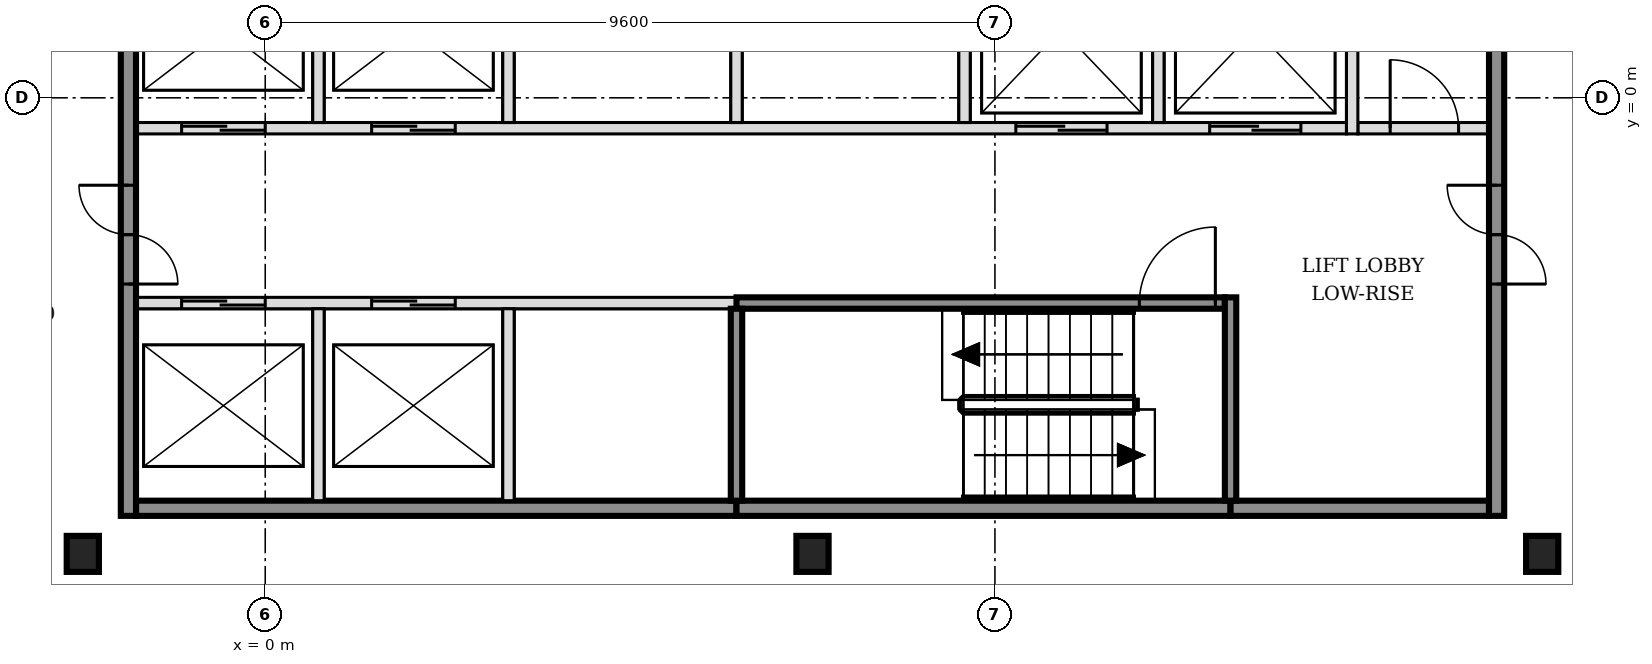
"""IFC4 building model, lengths in metres.
Left out: names, types, materials, properties, quantities, classifications, styles, units other than length and angle.
Written with IfcOpenShell. Run it as: python <this file> out.ifc"""

import sys

from ifc_helpers import new_model, si_unit, direction, frame, frame_2d, origin, origin_2d, place, context, subcontext, project, spatial, rectangle, i_section, extrude, element, fill, save


model = new_model("IFC4")
c1 = context("Model", 3, precision=1e-05, world=origin(), true_north=direction((0.0, 1.0)))
c2 = subcontext(c1, "Body", "Model", "MODEL_VIEW")
j1 = project(units=[si_unit("LENGTHUNIT", "METRE"), si_unit("PLANEANGLEUNIT", "RADIAN")], contexts=[c1])
p1 = place(None, origin())
s1 = spatial("IfcSite", under=j1, at=p1, CompositionType="ELEMENT")
p2 = place(p1, origin())
s2 = spatial("IfcBuilding", under=s1, at=p2, CompositionType="ELEMENT")
p3 = place(p2, frame((0.0, 0.0, 119.4)))
s3 = spatial("IfcBuildingStorey", under=s2, at=p3, CompositionType="ELEMENT", Elevation=119.4)
for number, where, z_axis, x_axis in (
    (1, (-2.4, -6.0, -0.25), (0.0, 0.0, 1.0), (1.0, 0.0, 0.0)),
    (2, (7.2, -6.0, -0.25), (0.0, 0.0, 1.0), (1.0, 0.0, 0.0)),
    (3, (16.8, -6.0, -0.25), (0.0, 0.0, 1.0), (1.0, 0.0, 0.0)),
):
    element("IfcColumn", number, at=place(p3, frame(where, z_axis=z_axis, x_axis=x_axis)), inside=s3, PredefinedType="COLUMN", context=c2, shape_type="SweptSolid", body=[
        extrude(i_section(OverallWidth=0.424, OverallDepth=0.474, WebThickness=0.048, FlangeThickness=0.077, FilletRadius=0.015, at=origin_2d()), origin(), (0.0, 0.0, 1.0), 6.1),
    ])
p4 = place(p3, frame((-1.7, -5.4, 0.0), z_axis=(0.0, 0.0, 1.0), x_axis=(1.0, 0.0, 0.0)))
e4 = element("IfcWall", 4, at=p4, inside=s3, PredefinedType="SOLIDWALL", context=c2, shape_type="SweptSolid", body=[
    extrude(rectangle(XDim=7.9, YDim=0.2, at=frame_2d((3.95, 0.0))), origin(), (0.0, 0.0, 1.0), 5.85),
])
p5 = place(p3, frame((6.2, -5.4, 0.0), z_axis=(0.0, 0.0, 1.0), x_axis=(1.0, 0.0, 0.0)))
e5 = element("IfcWall", 5, at=p5, inside=s3, PredefinedType="SOLIDWALL", context=c2, shape_type="SweptSolid", body=[
    extrude(rectangle(XDim=6.5, YDim=0.2, at=frame_2d((3.25, 0.0))), origin(), (0.0, 0.0, 1.0), 5.85),
])
p6 = place(p3, frame((12.7, -5.4, 0.0), z_axis=(0.0, 0.0, 1.0), x_axis=(1.0, 0.0, 0.0)))
e6 = element("IfcWall", 6, at=p6, inside=s3, PredefinedType="SOLIDWALL", context=c2, shape_type="SweptSolid", body=[
    extrude(rectangle(XDim=3.4, YDim=0.2, at=frame_2d((1.7, 0.0))), origin(), (0.0, 0.0, 1.0), 5.85),
])
p7 = place(p3, frame((-1.7, -2.7, 0.0), z_axis=(0.0, 0.0, 1.0), x_axis=(1.0, 0.0, 0.0)))
e7 = element("IfcWall", 7, at=p7, inside=s3, PredefinedType="SOLIDWALL", context=c2, shape_type="SweptSolid", body=[
    extrude(rectangle(XDim=7.9, YDim=0.15, at=frame_2d((3.95, 0.0))), origin(), (0.0, 0.0, 1.0), 5.85),
])
p8 = place(p7, frame((0.6, 0.0, 0.0)))
e8 = element("IfcOpeningElement", 8, at=p8, cuts=e7, PredefinedType="OPENING", context=c2, shape_type="SweptSolid", body=[
    extrude(rectangle(XDim=1.1, YDim=2.1, at=frame_2d((0.55, 1.05))), frame((0.0, 0.085, 0.0), z_axis=(0.0, -1.0, 0.0), x_axis=(1.0, 0.0, 0.0)), (0.0, 0.0, 1.0), 0.17),
])
p9 = place(p7, frame((3.1, 0.0, 0.0)))
e9 = element("IfcOpeningElement", 9, at=p9, cuts=e7, PredefinedType="OPENING", context=c2, shape_type="SweptSolid", body=[
    extrude(rectangle(XDim=1.1, YDim=2.1, at=frame_2d((0.55, 1.05))), frame((0.0, 0.085, 0.0), z_axis=(0.0, -1.0, 0.0), x_axis=(1.0, 0.0, 0.0)), (0.0, 0.0, 1.0), 0.17),
])
p10 = place(p3, frame((6.2, -2.7, 0.0), z_axis=(0.0, 0.0, 1.0), x_axis=(1.0, 0.0, 0.0)))
e10 = element("IfcWall", 10, at=p10, inside=s3, PredefinedType="SOLIDWALL", context=c2, shape_type="SweptSolid", body=[
    extrude(rectangle(XDim=6.425, YDim=0.15, at=frame_2d((3.212, 0.0))), origin(), (0.0, 0.0, 1.0), 5.85),
])
p11 = place(p10, frame((5.3, 0.0, 0.0)))
e11 = element("IfcOpeningElement", 11, at=p11, cuts=e10, PredefinedType="OPENING", context=c2, shape_type="SweptSolid", body=[
    extrude(rectangle(XDim=1.0, YDim=2.1, at=frame_2d((0.5, 1.05))), frame((0.0, 0.085, 0.0), z_axis=(0.0, -1.0, 0.0), x_axis=(1.0, 0.0, 0.0)), (0.0, 0.0, 1.0), 0.17),
])
p12 = place(p3, frame((-1.7, -0.4, 0.0), z_axis=(0.0, 0.0, 1.0), x_axis=(1.0, 0.0, 0.0)))
e12 = element("IfcWall", 12, at=p12, inside=s3, PredefinedType="SOLIDWALL", context=c2, shape_type="SweptSolid", body=[
    extrude(rectangle(XDim=15.925, YDim=0.15, at=frame_2d((7.962, 0.0))), origin(), (0.0, 0.0, 1.0), 5.85),
])
p13 = place(p12, frame((0.6, 0.0, 0.0)))
e13 = element("IfcOpeningElement", 13, at=p13, cuts=e12, PredefinedType="OPENING", context=c2, shape_type="SweptSolid", body=[
    extrude(rectangle(XDim=1.1, YDim=2.1, at=frame_2d((0.55, 1.05))), frame((0.0, 0.085, 0.0), z_axis=(0.0, -1.0, 0.0), x_axis=(1.0, 0.0, 0.0)), (0.0, 0.0, 1.0), 0.17),
])
p14 = place(p12, frame((3.1, 0.0, 0.0)))
e14 = element("IfcOpeningElement", 14, at=p14, cuts=e12, PredefinedType="OPENING", context=c2, shape_type="SweptSolid", body=[
    extrude(rectangle(XDim=1.1, YDim=2.1, at=frame_2d((0.55, 1.05))), frame((0.0, 0.085, 0.0), z_axis=(0.0, -1.0, 0.0), x_axis=(1.0, 0.0, 0.0)), (0.0, 0.0, 1.0), 0.17),
])
p15 = place(p12, frame((11.575, 0.0, 0.0)))
e15 = element("IfcOpeningElement", 15, at=p15, cuts=e12, PredefinedType="OPENING", context=c2, shape_type="SweptSolid", body=[
    extrude(rectangle(XDim=1.2, YDim=2.1, at=frame_2d((0.6, 1.05))), frame((0.0, 0.085, 0.0), z_axis=(0.0, -1.0, 0.0), x_axis=(1.0, 0.0, 0.0)), (0.0, 0.0, 1.0), 0.17),
])
p16 = place(p12, frame((14.125, 0.0, 0.0)))
e16 = element("IfcOpeningElement", 16, at=p16, cuts=e12, PredefinedType="OPENING", context=c2, shape_type="SweptSolid", body=[
    extrude(rectangle(XDim=1.2, YDim=2.1, at=frame_2d((0.6, 1.05))), frame((0.0, 0.085, 0.0), z_axis=(0.0, -1.0, 0.0), x_axis=(1.0, 0.0, 0.0)), (0.0, 0.0, 1.0), 0.17),
])
p17 = place(p3, frame((14.375, -0.4, 0.0), z_axis=(0.0, 0.0, 1.0), x_axis=(1.0, 0.0, 0.0)))
e17 = element("IfcWall", 17, at=p17, inside=s3, PredefinedType="PARTITIONING", context=c2, shape_type="SweptSolid", body=[
    extrude(rectangle(XDim=1.725, YDim=0.15, at=frame_2d((0.863, 0.0))), origin(), (0.0, 0.0, 1.0), 5.85),
])
p18 = place(p17, frame((0.425, 0.0, 0.0)))
e18 = element("IfcOpeningElement", 18, at=p18, cuts=e17, PredefinedType="OPENING", context=c2, shape_type="SweptSolid", body=[
    extrude(rectangle(XDim=0.9, YDim=2.1, at=frame_2d((0.45, 1.05))), frame((0.0, 0.085, 0.0), z_axis=(0.0, -1.0, 0.0), x_axis=(1.0, 0.0, 0.0)), (0.0, 0.0, 1.0), 0.17),
])
p19 = place(p3, frame((-1.8, -5.5, 0.0), z_axis=(0.0, 0.0, 1.0), x_axis=(0.0, 1.0, 0.0)))
e19 = element("IfcWall", 19, at=p19, inside=s3, PredefinedType="SOLIDWALL", context=c2, shape_type="SweptSolid", body=[
    extrude(rectangle(XDim=15.8, YDim=0.2, at=frame_2d((7.9, 0.0))), origin(), (0.0, 0.0, 1.0), 5.85),
])
p20 = place(p19, frame((3.05, 0.0, 0.0)))
e20 = element("IfcOpeningElement", 20, at=p20, cuts=e19, PredefinedType="OPENING", context=c2, shape_type="SweptSolid", body=[
    extrude(rectangle(XDim=1.3, YDim=2.1, at=frame_2d((0.65, 1.05))), frame((0.0, 0.11, 0.0), z_axis=(0.0, -1.0, 0.0), x_axis=(1.0, 0.0, 0.0)), (0.0, 0.0, 1.0), 0.22),
])
p21 = place(p19, frame((11.45, 0.0, 0.0)))
e21 = element("IfcOpeningElement", 21, at=p21, cuts=e19, PredefinedType="OPENING", context=c2, shape_type="SweptSolid", body=[
    extrude(rectangle(XDim=1.3, YDim=2.1, at=frame_2d((0.65, 1.05))), frame((0.0, 0.11, 0.0), z_axis=(0.0, -1.0, 0.0), x_axis=(1.0, 0.0, 0.0)), (0.0, 0.0, 1.0), 0.22),
])
p22 = place(p3, frame((0.7, -5.3, 0.0), z_axis=(0.0, 0.0, 1.0), x_axis=(0.0, 1.0, 0.0)))
e22 = element("IfcWall", 22, at=p22, inside=s3, PredefinedType="SOLIDWALL", context=c2, shape_type="SweptSolid", body=[
    extrude(rectangle(XDim=2.525, YDim=0.15, at=frame_2d((1.263, 0.0))), origin(), (0.0, 0.0, 1.0), 5.85),
])
p23 = place(p3, frame((0.7, -0.325, 0.0), z_axis=(0.0, 0.0, 1.0), x_axis=(0.0, 1.0, 0.0)))
e23 = element("IfcWall", 23, at=p23, inside=s3, PredefinedType="SOLIDWALL", context=c2, shape_type="SweptSolid", body=[
    extrude(rectangle(XDim=2.45, YDim=0.15, at=frame_2d((1.225, 0.0))), origin(), (0.0, 0.0, 1.0), 5.85),
])
p24 = place(p3, frame((3.2, -5.3, 0.0), z_axis=(0.0, 0.0, 1.0), x_axis=(0.0, 1.0, 0.0)))
e24 = element("IfcWall", 24, at=p24, inside=s3, PredefinedType="SOLIDWALL", context=c2, shape_type="SweptSolid", body=[
    extrude(rectangle(XDim=2.525, YDim=0.15, at=frame_2d((1.263, 0.0))), origin(), (0.0, 0.0, 1.0), 5.85),
])
p25 = place(p3, frame((3.2, -0.325, 0.0), z_axis=(0.0, 0.0, 1.0), x_axis=(0.0, 1.0, 0.0)))
e25 = element("IfcWall", 25, at=p25, inside=s3, PredefinedType="SOLIDWALL", context=c2, shape_type="SweptSolid", body=[
    extrude(rectangle(XDim=2.45, YDim=0.15, at=frame_2d((1.225, 0.0))), origin(), (0.0, 0.0, 1.0), 5.85),
])
p26 = place(p3, frame((6.2, -5.3, 0.0), z_axis=(0.0, 0.0, 1.0), x_axis=(0.0, 1.0, 0.0)))
e26 = element("IfcWall", 26, at=p26, inside=s3, PredefinedType="SOLIDWALL", context=c2, shape_type="SweptSolid", body=[
    extrude(rectangle(XDim=2.525, YDim=0.15, at=frame_2d((1.263, 0.0))), origin(), (0.0, 0.0, 1.0), 5.85),
])
for number, where, z_axis, x_axis in (
    (27, (6.2, -0.325, 0.0), (0.0, 0.0, 1.0), (0.0, 1.0, 0.0)),
    (28, (9.2, -0.325, 0.0), (0.0, 0.0, 1.0), (0.0, 1.0, 0.0)),
    (29, (11.75, -0.325, 0.0), (0.0, 0.0, 1.0), (0.0, 1.0, 0.0)),
):
    element("IfcWall", number, at=place(p3, frame(where, z_axis=z_axis, x_axis=x_axis)), inside=s3, PredefinedType="SOLIDWALL", context=c2, shape_type="SweptSolid", body=[
        extrude(rectangle(XDim=2.45, YDim=0.15, at=frame_2d((1.225, 0.0))), origin(), (0.0, 0.0, 1.0), 5.85),
    ])
p27 = place(p3, frame((12.7, -5.3, 0.0), z_axis=(0.0, 0.0, 1.0), x_axis=(0.0, 1.0, 0.0)))
e30 = element("IfcWall", 30, at=p27, inside=s3, PredefinedType="SOLIDWALL", context=c2, shape_type="SweptSolid", body=[
    extrude(rectangle(XDim=2.675, YDim=0.15, at=frame_2d((1.337, 0.0))), origin(), (0.0, 0.0, 1.0), 5.85),
])
p28 = place(p3, frame((14.3, -0.475, 0.0), z_axis=(0.0, 0.0, 1.0), x_axis=(0.0, 1.0, 0.0)))
e31 = element("IfcWall", 31, at=p28, inside=s3, PredefinedType="SOLIDWALL", context=c2, shape_type="SweptSolid", body=[
    extrude(rectangle(XDim=2.75, YDim=0.15, at=frame_2d((1.375, 0.0))), origin(), (0.0, 0.0, 1.0), 5.85),
])
p29 = place(p3, frame((16.2, -5.5, 0.0), z_axis=(0.0, 0.0, 1.0), x_axis=(0.0, 1.0, 0.0)))
e32 = element("IfcWall", 32, at=p29, inside=s3, PredefinedType="SOLIDWALL", context=c2, shape_type="SweptSolid", body=[
    extrude(rectangle(XDim=15.8, YDim=0.2, at=frame_2d((7.9, 0.0))), origin(), (0.0, 0.0, 1.0), 5.85),
])
p30 = place(p29, frame((3.05, 0.0, 0.0)))
e33 = element("IfcOpeningElement", 33, at=p30, cuts=e32, PredefinedType="OPENING", context=c2, shape_type="SweptSolid", body=[
    extrude(rectangle(XDim=1.3, YDim=2.1, at=frame_2d((0.65, 1.05))), frame((0.0, 0.11, 0.0), z_axis=(0.0, -1.0, 0.0), x_axis=(1.0, 0.0, 0.0)), (0.0, 0.0, 1.0), 0.22),
])
p31 = place(p29, frame((11.45, 0.0, 0.0)))
e34 = element("IfcOpeningElement", 34, at=p31, cuts=e32, PredefinedType="OPENING", context=c2, shape_type="SweptSolid", body=[
    extrude(rectangle(XDim=1.3, YDim=2.1, at=frame_2d((0.65, 1.05))), frame((0.0, 0.11, 0.0), z_axis=(0.0, -1.0, 0.0), x_axis=(1.0, 0.0, 0.0)), (0.0, 0.0, 1.0), 0.22),
])
p32 = place(p8, origin())
e35 = element("IfcDoor", 35, at=p32, inside=s3, OperationType="DOUBLE_DOOR_SLIDING", PredefinedType="DOOR", context=c2, shape_type="SweptSolid", body=[
    extrude(rectangle(XDim=1.1, YDim=2.1, at=frame_2d((0.55, 1.05))), frame((0.0, 0.025, 0.0), z_axis=(0.0, -1.0, 0.0), x_axis=(1.0, 0.0, 0.0)), (0.0, 0.0, 1.0), 0.05),
])
fill(e8, e35)
p33 = place(p9, origin())
e36 = element("IfcDoor", 36, at=p33, inside=s3, OperationType="DOUBLE_DOOR_SLIDING", PredefinedType="DOOR", context=c2, shape_type="SweptSolid", body=[
    extrude(rectangle(XDim=1.1, YDim=2.1, at=frame_2d((0.55, 1.05))), frame((0.0, 0.025, 0.0), z_axis=(0.0, -1.0, 0.0), x_axis=(1.0, 0.0, 0.0)), (0.0, 0.0, 1.0), 0.05),
])
fill(e9, e36)
p34 = place(p13, origin())
e37 = element("IfcDoor", 37, at=p34, inside=s3, OperationType="DOUBLE_DOOR_SLIDING", PredefinedType="DOOR", context=c2, shape_type="SweptSolid", body=[
    extrude(rectangle(XDim=1.1, YDim=2.1, at=frame_2d((0.55, 1.05))), frame((0.0, 0.025, 0.0), z_axis=(0.0, -1.0, 0.0), x_axis=(1.0, 0.0, 0.0)), (0.0, 0.0, 1.0), 0.05),
])
fill(e13, e37)
p35 = place(p14, origin())
e38 = element("IfcDoor", 38, at=p35, inside=s3, OperationType="DOUBLE_DOOR_SLIDING", PredefinedType="DOOR", context=c2, shape_type="SweptSolid", body=[
    extrude(rectangle(XDim=1.1, YDim=2.1, at=frame_2d((0.55, 1.05))), frame((0.0, 0.025, 0.0), z_axis=(0.0, -1.0, 0.0), x_axis=(1.0, 0.0, 0.0)), (0.0, 0.0, 1.0), 0.05),
])
fill(e14, e38)
p36 = place(p15, origin())
e39 = element("IfcDoor", 39, at=p36, inside=s3, OperationType="DOUBLE_DOOR_SLIDING", PredefinedType="DOOR", context=c2, shape_type="SweptSolid", body=[
    extrude(rectangle(XDim=1.2, YDim=2.1, at=frame_2d((0.6, 1.05))), frame((0.0, 0.025, 0.0), z_axis=(0.0, -1.0, 0.0), x_axis=(1.0, 0.0, 0.0)), (0.0, 0.0, 1.0), 0.05),
])
fill(e15, e39)
p37 = place(p16, origin())
e40 = element("IfcDoor", 40, at=p37, inside=s3, OperationType="DOUBLE_DOOR_SLIDING", PredefinedType="DOOR", context=c2, shape_type="SweptSolid", body=[
    extrude(rectangle(XDim=1.2, YDim=2.1, at=frame_2d((0.6, 1.05))), frame((0.0, 0.025, 0.0), z_axis=(0.0, -1.0, 0.0), x_axis=(1.0, 0.0, 0.0)), (0.0, 0.0, 1.0), 0.05),
])
fill(e16, e40)
p38 = place(p11, origin())
e41 = element("IfcDoor", 41, at=p38, inside=s3, OperationType="SINGLE_SWING_RIGHT", PredefinedType="DOOR", context=c2, shape_type="SweptSolid", body=[
    extrude(rectangle(XDim=1.0, YDim=2.1, at=frame_2d((0.5, 1.05))), frame((0.0, 0.025, 0.0), z_axis=(0.0, -1.0, 0.0), x_axis=(1.0, 0.0, 0.0)), (0.0, 0.0, 1.0), 0.05),
])
fill(e11, e41)
p39 = place(p20, origin())
e42 = element("IfcDoor", 42, at=p39, inside=s3, OperationType="DOUBLE_DOOR_SINGLE_SWING", PredefinedType="DOOR", context=c2, shape_type="SweptSolid", body=[
    extrude(rectangle(XDim=1.3, YDim=2.1, at=frame_2d((0.65, 1.05))), frame((0.0, 0.025, 0.0), z_axis=(0.0, -1.0, 0.0), x_axis=(1.0, 0.0, 0.0)), (0.0, 0.0, 1.0), 0.05),
])
fill(e20, e42)
p40 = place(p30, origin())
e43 = element("IfcDoor", 43, at=p40, inside=s3, OperationType="DOUBLE_DOOR_SINGLE_SWING", PredefinedType="DOOR", context=c2, shape_type="SweptSolid", body=[
    extrude(rectangle(XDim=1.3, YDim=2.1, at=frame_2d((0.65, 1.05))), frame((0.0, 0.025, 0.0), z_axis=(0.0, -1.0, 0.0), x_axis=(1.0, 0.0, 0.0)), (0.0, 0.0, 1.0), 0.05),
])
fill(e33, e43)
p41 = place(p18, origin())
e44 = element("IfcDoor", 44, at=p41, inside=s3, OperationType="SINGLE_SWING_LEFT", PredefinedType="DOOR", context=c2, shape_type="SweptSolid", body=[
    extrude(rectangle(XDim=0.9, YDim=2.1, at=frame_2d((0.45, 1.05))), frame((0.0, 0.025, 0.0), z_axis=(0.0, -1.0, 0.0), x_axis=(1.0, 0.0, 0.0)), (0.0, 0.0, 1.0), 0.05),
])
fill(e18, e44)
save(model, sys.argv[1])
